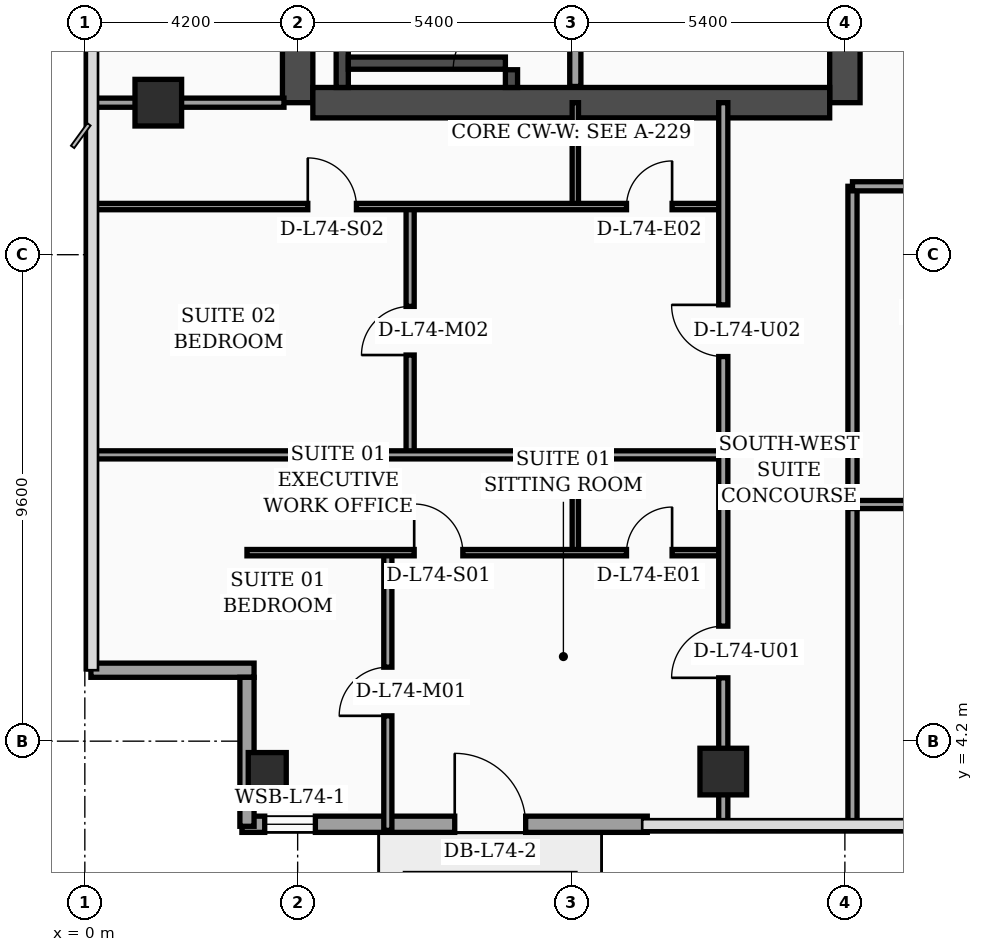
"""IFC4 building model, lengths in metres.
Left out: names, types, materials, properties, quantities, classifications, styles, units other than length and angle.
Written with IfcOpenShell. Run it as: python <this file> out.ifc"""

import sys

from ifc_helpers import new_model, si_unit, direction, frame, frame_2d, origin, origin_2d, place, context, subcontext, project, spatial, rectangle, hollow_rectangle, extrude, element, fill, save


model = new_model("IFC4")
c1 = context("Model", 3, precision=1e-05, world=origin(), true_north=direction((0.0, 1.0)))
c2 = subcontext(c1, "Body", "Model", "MODEL_VIEW")
j1 = project(units=[si_unit("LENGTHUNIT", "METRE"), si_unit("PLANEANGLEUNIT", "RADIAN")], contexts=[c1])
p1 = place(None, origin())
s1 = spatial("IfcSite", under=j1, at=p1, CompositionType="ELEMENT")
p2 = place(p1, origin())
s2 = spatial("IfcBuilding", under=s1, at=p2, CompositionType="ELEMENT")
p3 = place(p2, frame((0.0, 0.0, 298.7)))
s3 = spatial("IfcBuildingStorey", under=s2, at=p3, CompositionType="ELEMENT", Elevation=298.7)
p4 = place(p3, frame((4.2, 16.8, 0.0), z_axis=(0.0, 0.0, 1.0), x_axis=(0.0, 1.0, 0.0)))
e1 = element("IfcWall", 1, at=p4, inside=s3, PredefinedType="SHEAR", context=c2, shape_type="SweptSolid", body=[
    extrude(rectangle(XDim=21.6, YDim=0.6, at=frame_2d((10.8, 0.0))), origin(), (0.0, 0.0, 1.0), 3.56),
])
p5 = place(p3, frame((15.0, 16.8, 0.0), z_axis=(0.0, 0.0, 1.0), x_axis=(0.0, 1.0, 0.0)))
e2 = element("IfcWall", 2, at=p5, inside=s3, PredefinedType="SHEAR", context=c2, shape_type="SweptSolid", body=[
    extrude(rectangle(XDim=21.6, YDim=0.6, at=frame_2d((10.8, 0.0))), origin(), (0.0, 0.0, 1.0), 3.56),
])
p6 = place(p5, frame((8.65, 0.0, 0.0)))
e3 = element("IfcOpeningElement", 3, at=p6, cuts=e2, PredefinedType="OPENING", context=c2, shape_type="SweptSolid", body=[
    extrude(rectangle(XDim=1.1, YDim=2.2, at=frame_2d((0.55, 1.1))), frame((0.0, 0.31, 0.0), z_axis=(0.0, -1.0, 0.0), x_axis=(1.0, 0.0, 0.0)), (0.0, 0.0, 1.0), 0.62),
])
p7 = place(p5, frame((18.9, 0.0, 0.0)))
e4 = element("IfcOpeningElement", 4, at=p7, cuts=e2, PredefinedType="OPENING", context=c2, shape_type="SweptSolid", body=[
    extrude(rectangle(XDim=1.1, YDim=2.2, at=frame_2d((0.55, 1.1))), frame((0.0, 0.31, 0.0), z_axis=(0.0, -1.0, 0.0), x_axis=(1.0, 0.0, 0.0)), (0.0, 0.0, 1.0), 0.62),
])
p8 = place(p3, frame((4.5, 16.8, 0.0), z_axis=(0.0, 0.0, 1.0), x_axis=(1.0, 0.0, 0.0)))
e5 = element("IfcWall", 5, at=p8, inside=s3, PredefinedType="SHEAR", context=c2, shape_type="SweptSolid", body=[
    extrude(rectangle(XDim=10.2, YDim=0.6, at=frame_2d((5.1, 0.0))), origin(), (0.0, 0.0, 1.0), 3.56),
])
p9 = place(p3, frame((5.08, 17.1, 0.0), z_axis=(0.0, 0.0, 1.0), x_axis=(0.0, 1.0, 0.0)))
e6 = element("IfcWall", 6, at=p9, inside=s3, PredefinedType="SOLIDWALL", context=c2, shape_type="SweptSolid", body=[
    extrude(rectangle(XDim=9.69, YDim=0.24, at=frame_2d((4.845, 0.0))), origin(), (0.0, 0.0, 1.0), 3.56),
])
p10 = place(p3, frame((8.42, 17.1, 0.0), z_axis=(0.0, 0.0, 1.0), x_axis=(0.0, 1.0, 0.0)))
e7 = element("IfcWall", 7, at=p10, inside=s3, PredefinedType="SOLIDWALL", context=c2, shape_type="SweptSolid", body=[
    extrude(rectangle(XDim=9.69, YDim=0.24, at=frame_2d((4.845, 0.0))), origin(), (0.0, 0.0, 1.0), 3.56),
])
p11 = place(p10, frame((0.35, 0.0, 0.0)))
e8 = element("IfcOpeningElement", 8, at=p11, cuts=e7, PredefinedType="OPENING", context=c2, shape_type="SweptSolid", body=[
    extrude(rectangle(XDim=1.15, YDim=2.2, at=frame_2d((0.575, 1.1))), frame((0.0, 0.13, 0.0), z_axis=(0.0, -1.0, 0.0), x_axis=(1.0, 0.0, 0.0)), (0.0, 0.0, 1.0), 0.26),
])
p12 = place(p3, frame((5.2, 17.58, 0.0), z_axis=(0.0, 0.0, 1.0), x_axis=(1.0, 0.0, 0.0)))
e9 = element("IfcWall", 9, at=p12, inside=s3, PredefinedType="SOLIDWALL", context=c2, shape_type="SweptSolid", body=[
    extrude(rectangle(XDim=3.1, YDim=0.24, at=frame_2d((1.55, 0.0))), origin(), (0.0, 0.0, 1.0), 3.56),
])
p13 = place(p3, frame((3.6, 3.6, 0.0), z_axis=(0.0, 0.0, 1.0), x_axis=(1.0, 0.0, 0.0)))
e10 = element("IfcColumn", 10, at=p13, inside=s3, PredefinedType="COLUMN", context=c2, shape_type="SweptSolid", body=[
    extrude(hollow_rectangle(XDim=0.75, YDim=0.75, WallThickness=0.032, at=origin_2d()), origin(), (0.0, 0.0, 1.0), 3.56),
])
for number, where, z_axis, x_axis in (
    (11, (1.45, 16.8, 0.0), (0.0, 0.0, 1.0), (1.0, 0.0, 0.0)),
    (12, (12.6, 3.6, 0.0), (0.0, 0.0, 1.0), (1.0, 0.0, 0.0)),
):
    element("IfcColumn", number, at=place(p3, frame(where, z_axis=z_axis, x_axis=x_axis)), inside=s3, PredefinedType="COLUMN", context=c2, shape_type="SweptSolid", body=[
        extrude(rectangle(XDim=0.92, YDim=0.92, at=origin_2d()), origin(), (0.0, 0.0, 1.0), 3.56),
    ])
p14 = place(p3, frame((3.1, 2.56, 0.0), z_axis=(0.0, 0.0, 1.0), x_axis=(1.0, 0.0, 0.0)))
e13 = element("IfcWall", 13, at=p14, inside=s3, PredefinedType="SOLIDWALL", context=c2, shape_type="SweptSolid", body=[
    extrude(rectangle(XDim=8.0, YDim=0.32, at=frame_2d((4.0, 0.0))), origin(), (0.0, 0.0, 1.0), 3.56),
])
p15 = place(p14, frame((0.45, 0.0, 0.75)))
e14 = element("IfcOpeningElement", 14, at=p15, cuts=e13, PredefinedType="OPENING", context=c2, shape_type="SweptSolid", body=[
    extrude(rectangle(XDim=1.0, YDim=1.6, at=frame_2d((0.5, 0.8))), frame((0.0, 0.17, 0.0), z_axis=(0.0, -1.0, 0.0), x_axis=(1.0, 0.0, 0.0)), (0.0, 0.0, 1.0), 0.34),
])
p16 = place(p14, frame((4.2, 0.0, 0.0)))
e15 = element("IfcOpeningElement", 15, at=p16, cuts=e13, PredefinedType="OPENING", context=c2, shape_type="SweptSolid", body=[
    extrude(rectangle(XDim=1.4, YDim=2.25, at=frame_2d((0.7, 1.125))), frame((0.0, 0.17, 0.0), z_axis=(0.0, -1.0, 0.0), x_axis=(1.0, 0.0, 0.0)), (0.0, 0.0, 1.0), 0.34),
])
p17 = place(p3, frame((0.12, 5.6, 0.0), z_axis=(0.0, 0.0, 1.0), x_axis=(1.0, 0.0, 0.0)))
e16 = element("IfcWall", 16, at=p17, inside=s3, PredefinedType="SOLIDWALL", context=c2, shape_type="SweptSolid", body=[
    extrude(rectangle(XDim=3.22, YDim=0.28, at=frame_2d((1.61, 0.0))), origin(), (0.0, 0.0, 1.0), 2.99),
])
p18 = place(p3, frame((3.2, 5.46, 0.0), z_axis=(0.0, 0.0, 1.0), x_axis=(0.0, -1.0, 0.0)))
e17 = element("IfcWall", 17, at=p18, inside=s3, PredefinedType="SOLIDWALL", context=c2, shape_type="SweptSolid", body=[
    extrude(rectangle(XDim=2.94, YDim=0.28, at=frame_2d((1.47, 0.0))), origin(), (0.0, 0.0, 1.0), 2.99),
])
p19 = place(p3, frame((9.68, 17.12, 0.0), z_axis=(0.0, 0.0, 1.0), x_axis=(0.0, 1.0, 0.0)))
e18 = element("IfcWall", 18, at=p19, inside=s3, PredefinedType="SOLIDWALL", context=c2, shape_type="SweptSolid", body=[
    extrude(rectangle(XDim=7.88, YDim=0.22, at=frame_2d((3.94, 0.0))), origin(), (0.0, 0.0, 1.0), 3.56),
])
p20 = place(p3, frame((0.08, 16.8, 0.0), z_axis=(0.0, 0.0, 1.0), x_axis=(1.0, 0.0, 0.0)))
e19 = element("IfcWall", 19, at=p20, inside=s3, PredefinedType="PARTITIONING", context=c2, shape_type="SweptSolid", body=[
    extrude(rectangle(XDim=3.85, YDim=0.18, at=frame_2d((1.925, 0.0))), origin(), (0.0, 0.0, 1.0), 2.99),
])
p21 = place(p3, frame((9.68, 7.92, 0.0), z_axis=(0.0, 0.0, 1.0), x_axis=(0.0, 1.0, 0.0)))
e20 = element("IfcWall", 20, at=p21, inside=s3, PredefinedType="PARTITIONING", context=c2, shape_type="SweptSolid", body=[
    extrude(rectangle(XDim=1.93, YDim=0.125, at=frame_2d((0.965, 0.0))), origin(), (0.0, 0.0, 1.0), 3.09),
])
p22 = place(p3, frame((5.98, 2.44, 0.0), z_axis=(0.0, 0.0, 1.0), x_axis=(0.0, 1.0, 0.0)))
e21 = element("IfcWall", 21, at=p22, inside=s3, PredefinedType="PARTITIONING", context=c2, shape_type="SweptSolid", body=[
    extrude(rectangle(XDim=5.48, YDim=0.16, at=frame_2d((2.74, 0.0))), origin(), (0.0, 0.0, 1.0), 3.09),
])
p23 = place(p22, frame((2.26, 0.0, 0.0)))
e22 = element("IfcOpeningElement", 22, at=p23, cuts=e21, PredefinedType="OPENING", context=c2, shape_type="SweptSolid", body=[
    extrude(rectangle(XDim=0.96, YDim=2.2, at=frame_2d((0.48, 1.1))), frame((0.0, 0.09, 0.0), z_axis=(0.0, -1.0, 0.0), x_axis=(1.0, 0.0, 0.0)), (0.0, 0.0, 1.0), 0.18),
])
p24 = place(p3, frame((3.2, 7.92, 0.0), z_axis=(0.0, 0.0, 1.0), x_axis=(1.0, 0.0, 0.0)))
e23 = element("IfcWall", 23, at=p24, inside=s3, PredefinedType="PARTITIONING", context=c2, shape_type="SweptSolid", body=[
    extrude(rectangle(XDim=9.4, YDim=0.125, at=frame_2d((4.7, 0.0))), origin(), (0.0, 0.0, 1.0), 2.99),
])
p25 = place(p24, frame((3.3, 0.0, 0.0)))
e24 = element("IfcOpeningElement", 24, at=p25, cuts=e23, PredefinedType="OPENING", context=c2, shape_type="SweptSolid", body=[
    extrude(rectangle(XDim=0.96, YDim=2.2, at=frame_2d((0.48, 1.1))), frame((0.0, 0.073, 0.0), z_axis=(0.0, -1.0, 0.0), x_axis=(1.0, 0.0, 0.0)), (0.0, 0.0, 1.0), 0.145),
])
p26 = place(p24, frame((7.49, 0.0, 0.0)))
e25 = element("IfcOpeningElement", 25, at=p26, cuts=e23, PredefinedType="OPENING", context=c2, shape_type="SweptSolid", body=[
    extrude(rectangle(XDim=0.9, YDim=2.15, at=frame_2d((0.45, 1.075))), frame((0.0, 0.073, 0.0), z_axis=(0.0, -1.0, 0.0), x_axis=(1.0, 0.0, 0.0)), (0.0, 0.0, 1.0), 0.145),
])
p27 = place(p3, frame((9.68, 14.75, 0.0), z_axis=(0.0, 0.0, 1.0), x_axis=(0.0, 1.0, 0.0)))
e26 = element("IfcWall", 26, at=p27, inside=s3, PredefinedType="PARTITIONING", context=c2, shape_type="SweptSolid", body=[
    extrude(rectangle(XDim=2.05, YDim=0.125, at=frame_2d((1.025, 0.0))), origin(), (0.0, 0.0, 1.0), 3.56),
])
p28 = place(p3, frame((6.42, 9.85, 0.0), z_axis=(0.0, 0.0, 1.0), x_axis=(0.0, 1.0, 0.0)))
e27 = element("IfcWall", 27, at=p28, inside=s3, PredefinedType="PARTITIONING", context=c2, shape_type="SweptSolid", body=[
    extrude(rectangle(XDim=4.9, YDim=0.16, at=frame_2d((2.45, 0.0))), origin(), (0.0, 0.0, 1.0), 3.14),
])
p29 = place(p28, frame((1.97, 0.0, 0.0)))
e28 = element("IfcOpeningElement", 28, at=p29, cuts=e27, PredefinedType="OPENING", context=c2, shape_type="SweptSolid", body=[
    extrude(rectangle(XDim=0.96, YDim=2.2, at=frame_2d((0.48, 1.1))), frame((0.0, 0.09, 0.0), z_axis=(0.0, -1.0, 0.0), x_axis=(1.0, 0.0, 0.0)), (0.0, 0.0, 1.0), 0.18),
])
p30 = place(p3, frame((0.08, 14.75, 0.0), z_axis=(0.0, 0.0, 1.0), x_axis=(1.0, 0.0, 0.0)))
e29 = element("IfcWall", 29, at=p30, inside=s3, PredefinedType="PARTITIONING", context=c2, shape_type="SweptSolid", body=[
    extrude(rectangle(XDim=12.52, YDim=0.125, at=frame_2d((6.26, 0.0))), origin(), (0.0, 0.0, 1.0), 2.99),
])
p31 = place(p30, frame((4.32, 0.0, 0.0)))
e30 = element("IfcOpeningElement", 30, at=p31, cuts=e29, PredefinedType="OPENING", context=c2, shape_type="SweptSolid", body=[
    extrude(rectangle(XDim=0.96, YDim=2.2, at=frame_2d((0.48, 1.1))), frame((0.0, 0.073, 0.0), z_axis=(0.0, -1.0, 0.0), x_axis=(1.0, 0.0, 0.0)), (0.0, 0.0, 1.0), 0.145),
])
p32 = place(p30, frame((10.61, 0.0, 0.0)))
e31 = element("IfcOpeningElement", 31, at=p32, cuts=e29, PredefinedType="OPENING", context=c2, shape_type="SweptSolid", body=[
    extrude(rectangle(XDim=0.9, YDim=2.15, at=frame_2d((0.45, 1.075))), frame((0.0, 0.073, 0.0), z_axis=(0.0, -1.0, 0.0), x_axis=(1.0, 0.0, 0.0)), (0.0, 0.0, 1.0), 0.145),
])
p33 = place(p3, frame((0.08, 9.85, 0.0), z_axis=(0.0, 0.0, 1.0), x_axis=(1.0, 0.0, 0.0)))
e32 = element("IfcWall", 32, at=p33, inside=s3, PredefinedType="PARTITIONING", context=c2, shape_type="SweptSolid", body=[
    extrude(rectangle(XDim=12.52, YDim=0.16, at=frame_2d((6.26, 0.0))), origin(), (0.0, 0.0, 1.0), 2.99),
])
p34 = place(p3, frame((12.6, 2.44, 0.0), z_axis=(0.0, 0.0, 1.0), x_axis=(0.0, 1.0, 0.0)))
e33 = element("IfcWall", 33, at=p34, inside=s3, PredefinedType="PARTITIONING", context=c2, shape_type="SweptSolid", body=[
    extrude(rectangle(XDim=14.36, YDim=0.18, at=frame_2d((7.18, 0.0))), origin(), (0.0, 0.0, 1.0), 2.99),
])
p35 = place(p34, frame((3.01, 0.0, 0.0)))
e34 = element("IfcOpeningElement", 34, at=p35, cuts=e33, PredefinedType="OPENING", context=c2, shape_type="SweptSolid", body=[
    extrude(rectangle(XDim=1.02, YDim=2.2, at=frame_2d((0.51, 1.1))), frame((0.0, 0.1, 0.0), z_axis=(0.0, -1.0, 0.0), x_axis=(1.0, 0.0, 0.0)), (0.0, 0.0, 1.0), 0.2),
])
p36 = place(p34, frame((9.35, 0.0, 0.0)))
e35 = element("IfcOpeningElement", 35, at=p36, cuts=e33, PredefinedType="OPENING", context=c2, shape_type="SweptSolid", body=[
    extrude(rectangle(XDim=1.02, YDim=2.2, at=frame_2d((0.51, 1.1))), frame((0.0, 0.1, 0.0), z_axis=(0.0, -1.0, 0.0), x_axis=(1.0, 0.0, 0.0)), (0.0, 0.0, 1.0), 0.2),
])
p37 = place(p3, frame((15.15, 2.44, 0.0), z_axis=(0.0, 0.0, 1.0), x_axis=(0.0, 1.0, 0.0)))
e36 = element("IfcWall", 36, at=p37, inside=s3, PredefinedType="PARTITIONING", context=c2, shape_type="SweptSolid", body=[
    extrude(rectangle(XDim=12.71, YDim=0.18, at=frame_2d((6.355, 0.0))), origin(), (0.0, 0.0, 1.0), 3.09),
])
p38 = place(p3, frame((15.15, 8.87, 0.0), z_axis=(0.0, 0.0, 1.0), x_axis=(1.0, 0.0, 0.0)))
e37 = element("IfcWall", 37, at=p38, inside=s3, PredefinedType="PARTITIONING", context=c2, shape_type="SweptSolid", body=[
    extrude(rectangle(XDim=4.45, YDim=0.16, at=frame_2d((2.225, 0.0))), origin(), (0.0, 0.0, 1.0), 3.56),
])
p39 = place(p38, frame((1.75, 0.0, 0.0)))
e38 = element("IfcOpeningElement", 38, at=p39, cuts=e37, PredefinedType="OPENING", context=c2, shape_type="SweptSolid", body=[
    extrude(rectangle(XDim=0.96, YDim=2.2, at=frame_2d((0.48, 1.1))), frame((0.0, 0.09, 0.0), z_axis=(0.0, -1.0, 0.0), x_axis=(1.0, 0.0, 0.0)), (0.0, 0.0, 1.0), 0.18),
])
p40 = place(p3, frame((15.15, 15.15, 0.0), z_axis=(0.0, 0.0, 1.0), x_axis=(1.0, 0.0, 0.0)))
e39 = element("IfcWall", 39, at=p40, inside=s3, PredefinedType="PARTITIONING", context=c2, shape_type="SweptSolid", body=[
    extrude(rectangle(XDim=6.45, YDim=0.18, at=frame_2d((3.225, 0.0))), origin(), (0.0, 0.0, 1.0), 2.59),
])
p41 = place(p40, frame((1.74, 0.0, 0.0)))
e40 = element("IfcOpeningElement", 40, at=p41, cuts=e39, PredefinedType="OPENING", context=c2, shape_type="SweptSolid", body=[
    extrude(rectangle(XDim=1.02, YDim=2.2, at=frame_2d((0.51, 1.1))), frame((0.0, 0.1, 0.0), z_axis=(0.0, -1.0, 0.0), x_axis=(1.0, 0.0, 0.0)), (0.0, 0.0, 1.0), 0.2),
])
p42 = place(p15, origin())
e41 = element("IfcWindow", 41, at=p42, inside=s3, PartitioningType="SINGLE_PANEL", PredefinedType="WINDOW", context=c2, shape_type="SweptSolid", body=[
    extrude(rectangle(XDim=1.0, YDim=1.6, at=frame_2d((0.5, 0.8))), frame((0.0, 0.03, 0.0), z_axis=(0.0, -1.0, 0.0), x_axis=(1.0, 0.0, 0.0)), (0.0, 0.0, 1.0), 0.06),
])
fill(e14, e41)
p43 = place(p16, origin())
e42 = element("IfcDoor", 42, at=p43, inside=s3, OperationType="SINGLE_SWING_LEFT", PredefinedType="DOOR", context=c2, shape_type="SweptSolid", body=[
    extrude(rectangle(XDim=1.4, YDim=2.25, at=frame_2d((0.7, 1.125))), frame((0.0, 0.025, 0.0), z_axis=(0.0, -1.0, 0.0), x_axis=(1.0, 0.0, 0.0)), (0.0, 0.0, 1.0), 0.05),
])
fill(e15, e42)
p44 = place(p23, origin())
e43 = element("IfcDoor", 43, at=p44, inside=s3, OperationType="SINGLE_SWING_LEFT", PredefinedType="DOOR", context=c2, shape_type="SweptSolid", body=[
    extrude(rectangle(XDim=0.96, YDim=2.2, at=frame_2d((0.48, 1.1))), frame((0.0, 0.025, 0.0), z_axis=(0.0, -1.0, 0.0), x_axis=(1.0, 0.0, 0.0)), (0.0, 0.0, 1.0), 0.05),
])
fill(e22, e43)
p45 = place(p25, origin())
e44 = element("IfcDoor", 44, at=p45, inside=s3, OperationType="SINGLE_SWING_LEFT", PredefinedType="DOOR", context=c2, shape_type="SweptSolid", body=[
    extrude(rectangle(XDim=0.96, YDim=2.2, at=frame_2d((0.48, 1.1))), frame((0.0, 0.025, 0.0), z_axis=(0.0, -1.0, 0.0), x_axis=(1.0, 0.0, 0.0)), (0.0, 0.0, 1.0), 0.05),
])
fill(e24, e44)
p46 = place(p26, origin())
e45 = element("IfcDoor", 45, at=p46, inside=s3, OperationType="SINGLE_SWING_RIGHT", PredefinedType="DOOR", context=c2, shape_type="SweptSolid", body=[
    extrude(rectangle(XDim=0.9, YDim=2.15, at=frame_2d((0.45, 1.075))), frame((0.0, 0.025, 0.0), z_axis=(0.0, -1.0, 0.0), x_axis=(1.0, 0.0, 0.0)), (0.0, 0.0, 1.0), 0.05),
])
fill(e25, e45)
p47 = place(p29, origin())
e46 = element("IfcDoor", 46, at=p47, inside=s3, OperationType="SINGLE_SWING_LEFT", PredefinedType="DOOR", context=c2, shape_type="SweptSolid", body=[
    extrude(rectangle(XDim=0.96, YDim=2.2, at=frame_2d((0.48, 1.1))), frame((0.0, 0.025, 0.0), z_axis=(0.0, -1.0, 0.0), x_axis=(1.0, 0.0, 0.0)), (0.0, 0.0, 1.0), 0.05),
])
fill(e28, e46)
p48 = place(p31, origin())
e47 = element("IfcDoor", 47, at=p48, inside=s3, OperationType="SINGLE_SWING_LEFT", PredefinedType="DOOR", context=c2, shape_type="SweptSolid", body=[
    extrude(rectangle(XDim=0.96, YDim=2.2, at=frame_2d((0.48, 1.1))), frame((0.0, 0.025, 0.0), z_axis=(0.0, -1.0, 0.0), x_axis=(1.0, 0.0, 0.0)), (0.0, 0.0, 1.0), 0.05),
])
fill(e30, e47)
p49 = place(p32, origin())
e48 = element("IfcDoor", 48, at=p49, inside=s3, OperationType="SINGLE_SWING_RIGHT", PredefinedType="DOOR", context=c2, shape_type="SweptSolid", body=[
    extrude(rectangle(XDim=0.9, YDim=2.15, at=frame_2d((0.45, 1.075))), frame((0.0, 0.025, 0.0), z_axis=(0.0, -1.0, 0.0), x_axis=(1.0, 0.0, 0.0)), (0.0, 0.0, 1.0), 0.05),
])
fill(e31, e48)
p50 = place(p35, origin())
e49 = element("IfcDoor", 49, at=p50, inside=s3, OperationType="SINGLE_SWING_LEFT", PredefinedType="DOOR", context=c2, shape_type="SweptSolid", body=[
    extrude(rectangle(XDim=1.02, YDim=2.2, at=frame_2d((0.51, 1.1))), frame((0.0, 0.025, 0.0), z_axis=(0.0, -1.0, 0.0), x_axis=(1.0, 0.0, 0.0)), (0.0, 0.0, 1.0), 0.05),
])
fill(e34, e49)
p51 = place(p36, origin())
e50 = element("IfcDoor", 50, at=p51, inside=s3, OperationType="SINGLE_SWING_RIGHT", PredefinedType="DOOR", context=c2, shape_type="SweptSolid", body=[
    extrude(rectangle(XDim=1.02, YDim=2.2, at=frame_2d((0.51, 1.1))), frame((0.0, 0.025, 0.0), z_axis=(0.0, -1.0, 0.0), x_axis=(1.0, 0.0, 0.0)), (0.0, 0.0, 1.0), 0.05),
])
fill(e35, e50)
p52 = place(p11, origin())
e51 = element("IfcDoor", 51, at=p52, inside=s3, OperationType="SINGLE_SWING_LEFT", PredefinedType="DOOR", context=c2, shape_type="SweptSolid", body=[
    extrude(rectangle(XDim=1.15, YDim=2.2, at=frame_2d((0.575, 1.1))), frame((0.0, 0.025, 0.0), z_axis=(0.0, -1.0, 0.0), x_axis=(1.0, 0.0, 0.0)), (0.0, 0.0, 1.0), 0.05),
])
fill(e8, e51)
save(model, sys.argv[1])
